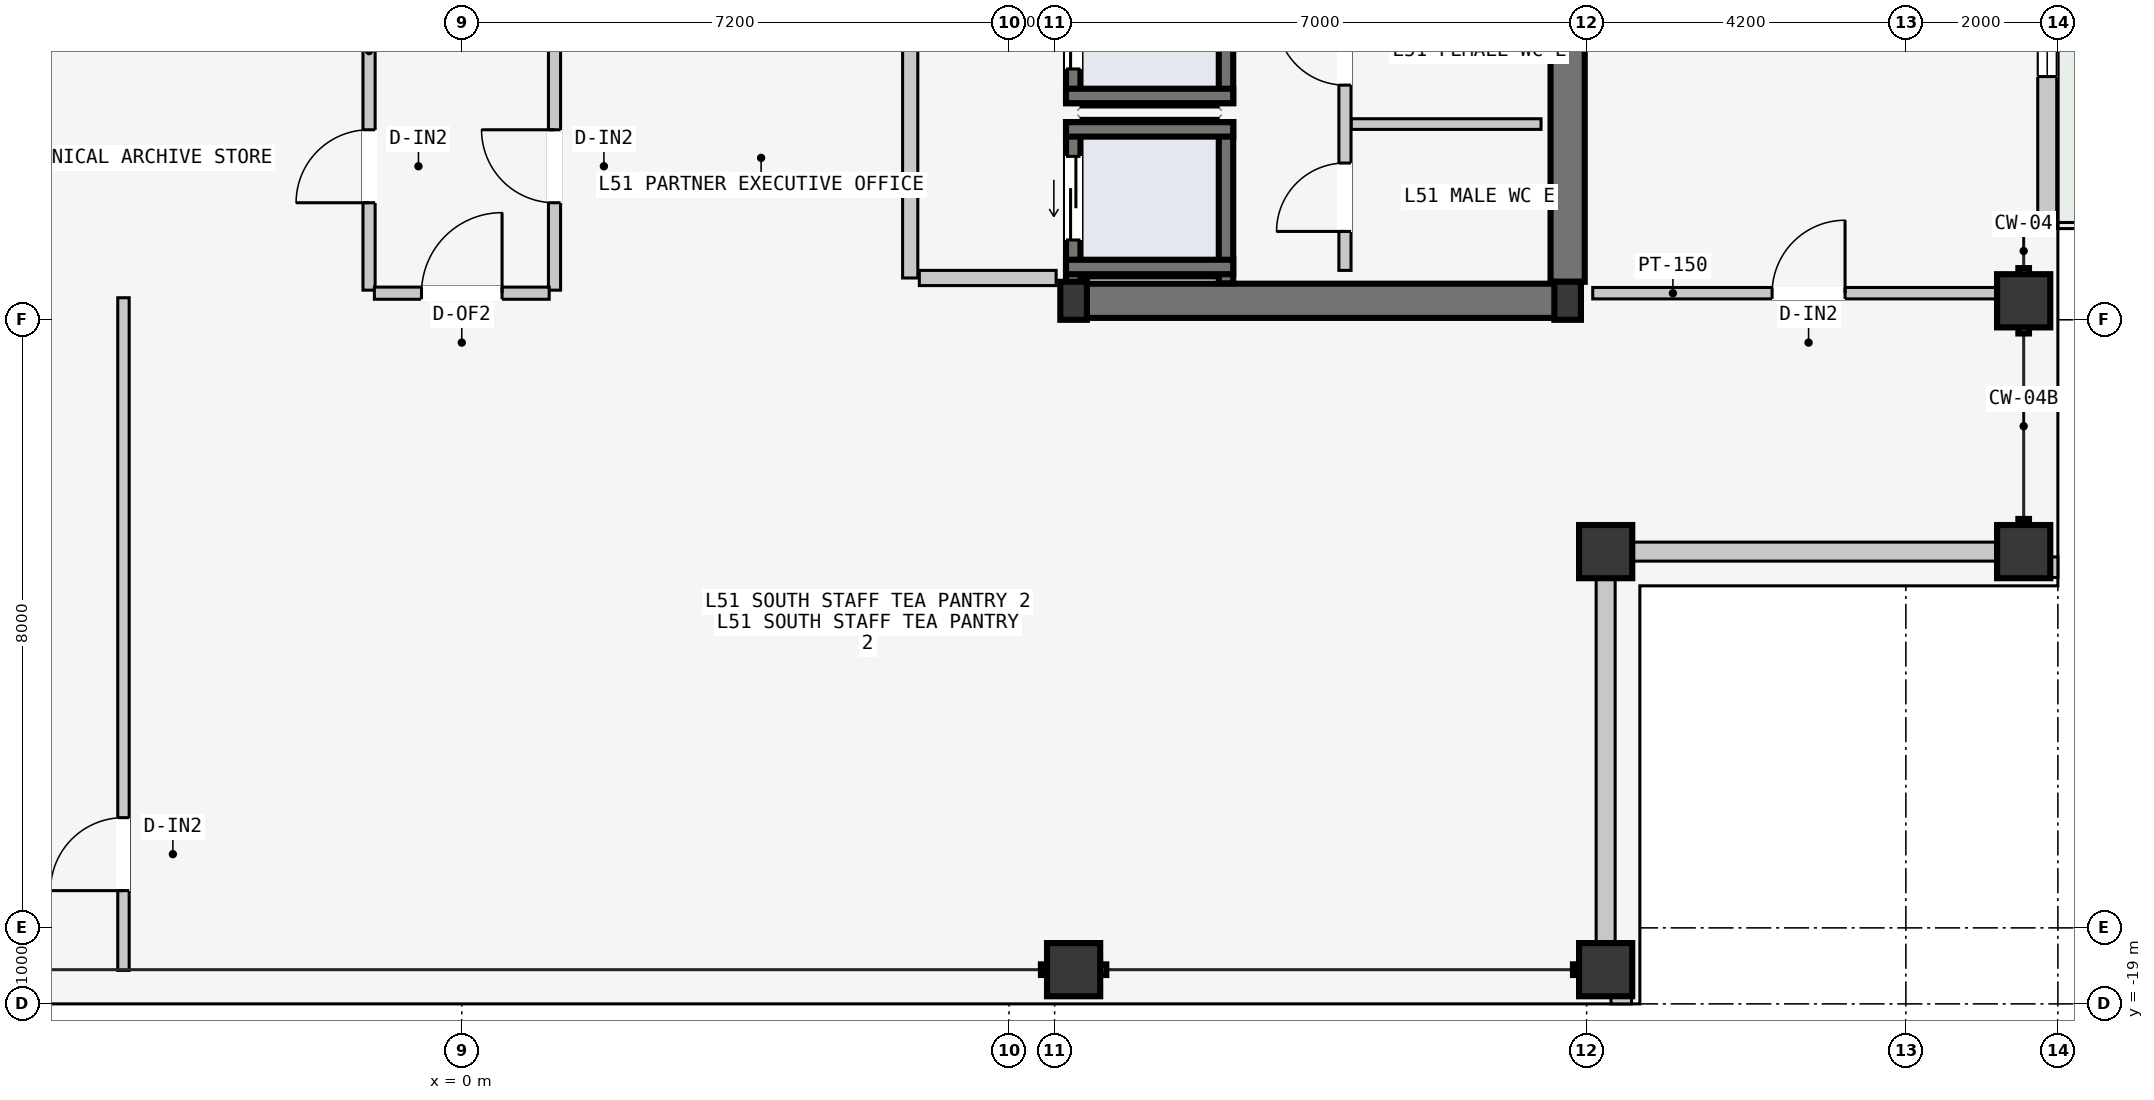
"""IFC4 building model, lengths in metres.
Left out: names, types, materials, properties, quantities, classifications, styles, units other than length and angle.
Written with IfcOpenShell. Run it as: python <this file> out.ifc"""

import sys

from ifc_helpers import new_model, si_unit, direction, frame, frame_2d, origin, origin_2d, place, context, subcontext, project, spatial, rectangle, hollow_rectangle, i_section, extrude, element, fill, save


model = new_model("IFC4")
c1 = context("Model", 3, precision=1e-05, world=origin(), true_north=direction((0.0, 1.0)))
c2 = subcontext(c1, "Body", "Model", "MODEL_VIEW")
j1 = project(units=[si_unit("LENGTHUNIT", "METRE"), si_unit("PLANEANGLEUNIT", "RADIAN")], contexts=[c1])
p1 = place(None, origin())
s1 = spatial("IfcSite", under=j1, at=p1, CompositionType="ELEMENT")
p2 = place(p1, origin())
s2 = spatial("IfcBuilding", under=s1, at=p2, CompositionType="ELEMENT")
p3 = place(p2, frame((0.0, 0.0, 194.7)))
s3 = spatial("IfcBuildingStorey", under=s2, at=p3, CompositionType="ELEMENT", Elevation=194.7)
p4 = place(p3, frame((8.07, -9.75, -0.2), z_axis=(0.0, 0.0, 1.0), x_axis=(1.0, 0.0, 0.0)))
e1 = element("IfcWall", 1, at=p4, inside=s3, PredefinedType="SHEAR", context=c2, shape_type="SweptSolid", body=[
    extrude(rectangle(XDim=6.46, YDim=0.45, at=frame_2d((3.23, 0.0))), origin(), (0.0, 0.0, 1.0), 3.6),
])
p5 = place(p3, frame((14.55, -9.5, -0.2), z_axis=(0.0, 0.0, 1.0), x_axis=(0.0, 1.0, 0.0)))
e2 = element("IfcWall", 2, at=p5, inside=s3, PredefinedType="SHEAR", context=c2, shape_type="SweptSolid", body=[
    extrude(rectangle(XDim=9.25, YDim=0.45, at=frame_2d((4.625, 0.0))), origin(), (0.0, 0.0, 1.0), 3.6),
])
for number, where, z_axis, x_axis in (
    (3, (8.05, -9.75, 0.0), (0.0, 0.0, 1.0), (1.0, 0.0, 0.0)),
    (4, (14.55, -9.75, 0.0), (0.0, 0.0, 1.0), (1.0, 0.0, 0.0)),
):
    element("IfcColumn", number, at=place(p3, frame(where, z_axis=z_axis, x_axis=x_axis)), inside=s3, PredefinedType="COLUMN", context=c2, shape_type="SweptSolid", body=[
        extrude(i_section(OverallWidth=0.35, OverallDepth=0.5, WebThickness=0.02, FlangeThickness=0.032, at=origin_2d()), origin(), (0.0, 0.0, 1.0), 3.6),
    ])
for number, where, z_axis, x_axis in (
    (5, (8.05, -18.55, 0.0), (0.0, 0.0, 1.0), (1.0, 0.0, 0.0)),
    (6, (15.05, -18.55, 0.0), (0.0, 0.0, 1.0), (1.0, 0.0, 0.0)),
    (7, (20.55, -13.05, 0.0), (0.0, 0.0, 1.0), (0.0, 1.0, 0.0)),
    (8, (20.55, -9.75, 0.0), (0.0, 0.0, 1.0), (0.0, 1.0, 0.0)),
    (9, (15.05, -13.05, 0.0), (0.0, 0.0, 1.0), (1.0, 0.0, 0.0)),
):
    element("IfcColumn", number, at=place(p3, frame(where, z_axis=z_axis, x_axis=x_axis)), inside=s3, PredefinedType="COLUMN", context=c2, shape_type="SweptSolid", body=[
        extrude(hollow_rectangle(XDim=0.7, YDim=0.7, WallThickness=0.03, at=origin_2d()), origin(), (0.0, 0.0, 1.0), 3.6),
    ])
p6 = place(p3, frame((20.86, -8.8, 0.0), z_axis=(0.0, 0.0, 1.0), x_axis=(0.0, 1.0, 0.0)))
e10 = element("IfcWall", 10, at=p6, inside=s3, PredefinedType="STANDARD", context=c2, shape_type="SweptSolid", body=[
    extrude(rectangle(XDim=10.8, YDim=0.25, at=frame_2d((5.4, 0.0))), origin(), (0.0, 0.0, 1.0), 3.4),
])
p7 = place(p6, frame((6.4, 0.0, 0.0)))
e11 = element("IfcOpeningElement", 11, at=p7, cuts=e10, PredefinedType="OPENING", context=c2, shape_type="SweptSolid", body=[
    extrude(rectangle(XDim=1.6, YDim=2.2, at=frame_2d((0.8, 1.1))), frame((0.0, 0.135, 0.0), z_axis=(0.0, -1.0, 0.0), x_axis=(1.0, 0.0, 0.0)), (0.0, 0.0, 1.0), 0.27),
])
p8 = place(p6, frame((2.0, 0.0, 0.85)))
e12 = element("IfcOpeningElement", 12, at=p8, cuts=e10, PredefinedType="OPENING", context=c2, shape_type="SweptSolid", body=[
    extrude(rectangle(XDim=2.0, YDim=2.1, at=frame_2d((1.0, 1.05))), frame((0.0, 0.135, 0.0), z_axis=(0.0, -1.0, 0.0), x_axis=(1.0, 0.0, 0.0)), (0.0, 0.0, 1.0), 0.27),
])
for number, where, z_axis, x_axis in (
    (13, (15.41, -13.05, 0.0), (0.0, 0.0, 1.0), (1.0, 0.0, 0.0)),
    (14, (15.05, -18.19, 0.0), (0.0, 0.0, 1.0), (0.0, 1.0, 0.0)),
):
    element("IfcWall", number, at=place(p3, frame(where, z_axis=z_axis, x_axis=x_axis)), inside=s3, PredefinedType="STANDARD", context=c2, shape_type="SweptSolid", body=[
        extrude(rectangle(XDim=4.78, YDim=0.25, at=frame_2d((2.39, 0.0))), origin(), (0.0, 0.0, 1.0), 2.75),
    ])
for number, where, z_axis, x_axis in (
    (15, (15.12, -18.89, 0.0), (0.0, 0.0, 1.0), (1.0, 0.0, 0.0)),
    (16, (20.89, -13.39, 0.0), (0.0, 0.0, 1.0), (0.0, 1.0, 0.0)),
):
    element("IfcWall", number, at=place(p3, frame(where, z_axis=z_axis, x_axis=x_axis)), inside=s3, PredefinedType="PARAPET", context=c2, shape_type="SweptSolid", body=[
        extrude(rectangle(XDim=0.27, YDim=0.22, at=frame_2d((0.135, 0.0))), origin(), (0.0, 0.0, 1.0), 1.2),
    ])
p9 = place(p3, frame((8.045, -9.52, -0.2), z_axis=(0.0, 0.0, 1.0), x_axis=(0.0, 1.0, 0.0)))
e17 = element("IfcWall", 17, at=p9, inside=s3, PredefinedType="SOLIDWALL", context=c2, shape_type="SweptSolid", body=[
    extrude(rectangle(XDim=2.12, YDim=0.19, at=frame_2d((1.06, 0.0))), origin(), (0.0, 0.0, 1.0), 3.6),
])
p10 = place(p9, frame((0.57, 0.0, 0.2)))
e18 = element("IfcOpeningElement", 18, at=p10, cuts=e17, PredefinedType="OPENING", context=c2, shape_type="SweptSolid", body=[
    extrude(rectangle(XDim=1.1, YDim=2.2, at=frame_2d((0.55, 1.1))), frame((0.0, 0.105, 0.0), z_axis=(0.0, -1.0, 0.0), x_axis=(1.0, 0.0, 0.0)), (0.0, 0.0, 1.0), 0.21),
])
p11 = place(p3, frame((10.055, -9.52, -0.2), z_axis=(0.0, 0.0, 1.0), x_axis=(0.0, 1.0, 0.0)))
e19 = element("IfcWall", 19, at=p11, inside=s3, PredefinedType="SOLIDWALL", context=c2, shape_type="SweptSolid", body=[
    extrude(rectangle(XDim=2.12, YDim=0.19, at=frame_2d((1.06, 0.0))), origin(), (0.0, 0.0, 1.0), 3.6),
])
for number, where, z_axis, x_axis in (
    (20, (7.95, -7.495, -0.2), (0.0, 0.0, 1.0), (1.0, 0.0, 0.0)),
    (21, (7.95, -9.305, -0.2), (0.0, 0.0, 1.0), (1.0, 0.0, 0.0)),
):
    element("IfcWall", number, at=place(p3, frame(where, z_axis=z_axis, x_axis=x_axis)), inside=s3, PredefinedType="SOLIDWALL", context=c2, shape_type="SweptSolid", body=[
        extrude(rectangle(XDim=2.2, YDim=0.19, at=frame_2d((1.1, 0.0))), origin(), (0.0, 0.0, 1.0), 3.6),
    ])
p12 = place(p3, frame((8.045, -7.15, -0.2), z_axis=(0.0, 0.0, 1.0), x_axis=(0.0, 1.0, 0.0)))
e22 = element("IfcWall", 22, at=p12, inside=s3, PredefinedType="SOLIDWALL", context=c2, shape_type="SweptSolid", body=[
    extrude(rectangle(XDim=2.0, YDim=0.19, at=frame_2d((1.0, 0.0))), origin(), (0.0, 0.0, 1.0), 3.6),
])
p13 = place(p12, frame((0.45, 0.0, 0.2)))
e23 = element("IfcOpeningElement", 23, at=p13, cuts=e22, PredefinedType="OPENING", context=c2, shape_type="SweptSolid", body=[
    extrude(rectangle(XDim=1.1, YDim=2.2, at=frame_2d((0.55, 1.1))), frame((0.0, 0.105, 0.0), z_axis=(0.0, -1.0, 0.0), x_axis=(1.0, 0.0, 0.0)), (0.0, 0.0, 1.0), 0.21),
])
p14 = place(p3, frame((10.055, -7.15, -0.2), z_axis=(0.0, 0.0, 1.0), x_axis=(0.0, 1.0, 0.0)))
e24 = element("IfcWall", 24, at=p14, inside=s3, PredefinedType="SOLIDWALL", context=c2, shape_type="SweptSolid", body=[
    extrude(rectangle(XDim=2.0, YDim=0.19, at=frame_2d((1.0, 0.0))), origin(), (0.0, 0.0, 1.0), 3.6),
])
p15 = place(p3, frame((7.95, -7.055, -0.2), z_axis=(0.0, 0.0, 1.0), x_axis=(1.0, 0.0, 0.0)))
e25 = element("IfcWall", 25, at=p15, inside=s3, PredefinedType="SOLIDWALL", context=c2, shape_type="SweptSolid", body=[
    extrude(rectangle(XDim=2.2, YDim=0.19, at=frame_2d((1.1, 0.0))), origin(), (0.0, 0.0, 1.0), 3.6),
])
p16 = place(p3, frame((5.9, -9.45, 0.0), z_axis=(0.0, 0.0, 1.0), x_axis=(0.0, 1.0, 0.0)))
e26 = element("IfcWall", 26, at=p16, inside=s3, PredefinedType="PARTITIONING", context=c2, shape_type="SweptSolid", body=[
    extrude(rectangle(XDim=10.5, YDim=0.2, at=frame_2d((5.25, 0.0))), origin(), (0.0, 0.0, 1.0), 3.4),
])
p17 = place(p16, frame((3.9, 0.0, 0.0)))
e27 = element("IfcOpeningElement", 27, at=p17, cuts=e26, PredefinedType="OPENING", context=c2, shape_type="SweptSolid", body=[
    extrude(rectangle(XDim=1.5, YDim=2.2, at=frame_2d((0.75, 1.1))), frame((0.0, 0.11, 0.0), z_axis=(0.0, -1.0, 0.0), x_axis=(1.0, 0.0, 0.0)), (0.0, 0.0, 1.0), 0.22),
])
p18 = place(p3, frame((6.02, -9.45, 0.0), z_axis=(0.0, 0.0, 1.0), x_axis=(1.0, 0.0, 0.0)))
e28 = element("IfcWall", 28, at=p18, inside=s3, PredefinedType="PARTITIONING", context=c2, shape_type="SweptSolid", body=[
    extrude(rectangle(XDim=1.8, YDim=0.2, at=frame_2d((0.9, 0.0))), origin(), (0.0, 0.0, 1.0), 3.4),
])
p19 = place(p3, frame((11.7, -7.425, 0.0), z_axis=(0.0, 0.0, 1.0), x_axis=(1.0, 0.0, 0.0)))
e29 = element("IfcWall", 29, at=p19, inside=s3, PredefinedType="PARTITIONING", context=c2, shape_type="SweptSolid", body=[
    extrude(rectangle(XDim=2.5, YDim=0.14, at=frame_2d((1.25, 0.0))), origin(), (0.0, 0.0, 1.0), 3.4),
])
p20 = place(p3, frame((11.62, -9.35, 0.0), z_axis=(0.0, 0.0, 1.0), x_axis=(0.0, 1.0, 0.0)))
e30 = element("IfcWall", 30, at=p20, inside=s3, PredefinedType="PARTITIONING", context=c2, shape_type="SweptSolid", body=[
    extrude(rectangle(XDim=3.85, YDim=0.16, at=frame_2d((1.925, 0.0))), origin(), (0.0, 0.0, 1.0), 3.4),
])
p21 = place(p20, frame((0.512, 0.0, 0.0)))
e31 = element("IfcOpeningElement", 31, at=p21, cuts=e30, PredefinedType="OPENING", context=c2, shape_type="SweptSolid", body=[
    extrude(rectangle(XDim=0.9, YDim=2.15, at=frame_2d((0.45, 1.075))), frame((0.0, 0.09, 0.0), z_axis=(0.0, -1.0, 0.0), x_axis=(1.0, 0.0, 0.0)), (0.0, 0.0, 1.0), 0.18),
])
p22 = place(p20, frame((2.438, 0.0, 0.0)))
e32 = element("IfcOpeningElement", 32, at=p22, cuts=e30, PredefinedType="OPENING", context=c2, shape_type="SweptSolid", body=[
    extrude(rectangle(XDim=0.9, YDim=2.15, at=frame_2d((0.45, 1.075))), frame((0.0, 0.09, 0.0), z_axis=(0.0, -1.0, 0.0), x_axis=(1.0, 0.0, 0.0)), (0.0, 0.0, 1.0), 0.18),
])
p23 = place(p3, frame((-1.22, -9.61, 0.0), z_axis=(0.0, 0.0, 1.0), x_axis=(0.0, 1.0, 0.0)))
e33 = element("IfcWall", 33, at=p23, inside=s3, PredefinedType="PARTITIONING", context=c2, shape_type="SweptSolid", body=[
    extrude(rectangle(XDim=3.93, YDim=0.16, at=frame_2d((1.965, 0.0))), origin(), (0.0, 0.0, 1.0), 3.4),
])
p24 = place(p23, frame((1.15, 0.0, 0.0)))
e34 = element("IfcOpeningElement", 34, at=p24, cuts=e33, PredefinedType="OPENING", context=c2, shape_type="SweptSolid", body=[
    extrude(rectangle(XDim=0.96, YDim=2.18, at=frame_2d((0.48, 1.09))), frame((0.0, 0.09, 0.0), z_axis=(0.0, -1.0, 0.0), x_axis=(1.0, 0.0, 0.0)), (0.0, 0.0, 1.0), 0.18),
])
p25 = place(p3, frame((1.22, -9.61, 0.0), z_axis=(0.0, 0.0, 1.0), x_axis=(0.0, 1.0, 0.0)))
e35 = element("IfcWall", 35, at=p25, inside=s3, PredefinedType="PARTITIONING", context=c2, shape_type="SweptSolid", body=[
    extrude(rectangle(XDim=3.93, YDim=0.16, at=frame_2d((1.965, 0.0))), origin(), (0.0, 0.0, 1.0), 3.4),
])
p26 = place(p25, frame((1.15, 0.0, 0.0)))
e36 = element("IfcOpeningElement", 36, at=p26, cuts=e35, PredefinedType="OPENING", context=c2, shape_type="SweptSolid", body=[
    extrude(rectangle(XDim=0.96, YDim=2.18, at=frame_2d((0.48, 1.09))), frame((0.0, 0.09, 0.0), z_axis=(0.0, -1.0, 0.0), x_axis=(1.0, 0.0, 0.0)), (0.0, 0.0, 1.0), 0.18),
])
p27 = place(p3, frame((-4.451, -18.56, 0.0), z_axis=(0.0, 0.0, 1.0), x_axis=(0.0, 1.0, 0.0)))
e37 = element("IfcWall", 37, at=p27, inside=s3, PredefinedType="PARTITIONING", context=c2, shape_type="SweptSolid", body=[
    extrude(rectangle(XDim=8.85, YDim=0.15, at=frame_2d((4.425, 0.0))), origin(), (0.0, 0.0, 1.0), 3.4),
])
p28 = place(p27, frame((1.05, 0.0, 0.0)))
e38 = element("IfcOpeningElement", 38, at=p28, cuts=e37, PredefinedType="OPENING", context=c2, shape_type="SweptSolid", body=[
    extrude(rectangle(XDim=0.96, YDim=2.18, at=frame_2d((0.48, 1.09))), frame((0.0, 0.085, 0.0), z_axis=(0.0, -1.0, 0.0), x_axis=(1.0, 0.0, 0.0)), (0.0, 0.0, 1.0), 0.17),
])
p29 = place(p3, frame((-1.15, -9.65, 0.0), z_axis=(0.0, 0.0, 1.0), x_axis=(1.0, 0.0, 0.0)))
e39 = element("IfcWall", 39, at=p29, inside=s3, PredefinedType="PARTITIONING", context=c2, shape_type="SweptSolid", body=[
    extrude(rectangle(XDim=2.3, YDim=0.16, at=frame_2d((1.15, 0.0))), origin(), (0.0, 0.0, 1.0), 2.75),
])
p30 = place(p29, frame((0.62, 0.0, 0.0)))
e40 = element("IfcOpeningElement", 40, at=p30, cuts=e39, PredefinedType="OPENING", context=c2, shape_type="SweptSolid", body=[
    extrude(rectangle(XDim=1.06, YDim=2.2, at=frame_2d((0.53, 1.1))), frame((0.0, 0.09, 0.0), z_axis=(0.0, -1.0, 0.0), x_axis=(1.0, 0.0, 0.0)), (0.0, 0.0, 1.0), 0.18),
])
p31 = place(p3, frame((14.88, -9.65, 0.0), z_axis=(0.0, 0.0, 1.0), x_axis=(1.0, 0.0, 0.0)))
e41 = element("IfcWall", 41, at=p31, inside=s3, PredefinedType="PARTITIONING", context=c2, shape_type="SweptSolid", body=[
    extrude(rectangle(XDim=5.68, YDim=0.15, at=frame_2d((2.84, 0.0))), origin(), (0.0, 0.0, 1.0), 2.75),
])
p32 = place(p31, frame((2.36, 0.0, 0.0)))
e42 = element("IfcOpeningElement", 42, at=p32, cuts=e41, PredefinedType="OPENING", context=c2, shape_type="SweptSolid", body=[
    extrude(rectangle(XDim=0.96, YDim=2.18, at=frame_2d((0.48, 1.09))), frame((0.0, 0.085, 0.0), z_axis=(0.0, -1.0, 0.0), x_axis=(1.0, 0.0, 0.0)), (0.0, 0.0, 1.0), 0.17),
])
p33 = place(p8, origin())
e43 = element("IfcWindow", 43, at=p33, inside=s3, PartitioningType="SINGLE_PANEL", PredefinedType="WINDOW", context=c2, shape_type="SweptSolid", body=[
    extrude(rectangle(XDim=2.0, YDim=2.1, at=frame_2d((1.0, 1.05))), frame((0.0, 0.03, 0.0), z_axis=(0.0, -1.0, 0.0), x_axis=(1.0, 0.0, 0.0)), (0.0, 0.0, 1.0), 0.06),
])
fill(e12, e43)
p34 = place(p10, origin())
e44 = element("IfcDoor", 44, at=p34, inside=s3, OperationType="SLIDING_TO_LEFT", PredefinedType="DOOR", context=c2, shape_type="SweptSolid", body=[
    extrude(rectangle(XDim=1.1, YDim=2.2, at=frame_2d((0.55, 1.1))), frame((0.0, 0.025, 0.0), z_axis=(0.0, -1.0, 0.0), x_axis=(1.0, 0.0, 0.0)), (0.0, 0.0, 1.0), 0.05),
])
fill(e18, e44)
p35 = place(p13, origin())
e45 = element("IfcDoor", 45, at=p35, inside=s3, OperationType="SLIDING_TO_LEFT", PredefinedType="DOOR", context=c2, shape_type="SweptSolid", body=[
    extrude(rectangle(XDim=1.1, YDim=2.2, at=frame_2d((0.55, 1.1))), frame((0.0, 0.025, 0.0), z_axis=(0.0, -1.0, 0.0), x_axis=(1.0, 0.0, 0.0)), (0.0, 0.0, 1.0), 0.05),
])
fill(e23, e45)
p36 = place(p21, origin())
e46 = element("IfcDoor", 46, at=p36, inside=s3, OperationType="SINGLE_SWING_LEFT", PredefinedType="DOOR", context=c2, shape_type="SweptSolid", body=[
    extrude(rectangle(XDim=0.9, YDim=2.15, at=frame_2d((0.45, 1.075))), frame((0.0, 0.025, 0.0), z_axis=(0.0, -1.0, 0.0), x_axis=(1.0, 0.0, 0.0)), (0.0, 0.0, 1.0), 0.05),
])
fill(e31, e46)
p37 = place(p22, origin())
e47 = element("IfcDoor", 47, at=p37, inside=s3, OperationType="SINGLE_SWING_RIGHT", PredefinedType="DOOR", context=c2, shape_type="SweptSolid", body=[
    extrude(rectangle(XDim=0.9, YDim=2.15, at=frame_2d((0.45, 1.075))), frame((0.0, 0.025, 0.0), z_axis=(0.0, -1.0, 0.0), x_axis=(1.0, 0.0, 0.0)), (0.0, 0.0, 1.0), 0.05),
])
fill(e32, e47)
p38 = place(p24, origin())
e48 = element("IfcDoor", 48, at=p38, inside=s3, OperationType="SINGLE_SWING_LEFT", PredefinedType="DOOR", context=c2, shape_type="SweptSolid", body=[
    extrude(rectangle(XDim=0.96, YDim=2.18, at=frame_2d((0.48, 1.09))), frame((0.0, 0.025, 0.0), z_axis=(0.0, -1.0, 0.0), x_axis=(1.0, 0.0, 0.0)), (0.0, 0.0, 1.0), 0.05),
])
fill(e34, e48)
p39 = place(p26, origin())
e49 = element("IfcDoor", 49, at=p39, inside=s3, OperationType="SINGLE_SWING_RIGHT", PredefinedType="DOOR", context=c2, shape_type="SweptSolid", body=[
    extrude(rectangle(XDim=0.96, YDim=2.18, at=frame_2d((0.48, 1.09))), frame((0.0, 0.025, 0.0), z_axis=(0.0, -1.0, 0.0), x_axis=(1.0, 0.0, 0.0)), (0.0, 0.0, 1.0), 0.05),
])
fill(e36, e49)
p40 = place(p28, origin())
e50 = element("IfcDoor", 50, at=p40, inside=s3, OperationType="SINGLE_SWING_LEFT", PredefinedType="DOOR", context=c2, shape_type="SweptSolid", body=[
    extrude(rectangle(XDim=0.96, YDim=2.18, at=frame_2d((0.48, 1.09))), frame((0.0, 0.025, 0.0), z_axis=(0.0, -1.0, 0.0), x_axis=(1.0, 0.0, 0.0)), (0.0, 0.0, 1.0), 0.05),
])
fill(e38, e50)
p41 = place(p30, origin())
e51 = element("IfcDoor", 51, at=p41, inside=s3, OperationType="SINGLE_SWING_RIGHT", PredefinedType="DOOR", context=c2, shape_type="SweptSolid", body=[
    extrude(rectangle(XDim=1.06, YDim=2.2, at=frame_2d((0.53, 1.1))), frame((0.0, 0.025, 0.0), z_axis=(0.0, -1.0, 0.0), x_axis=(1.0, 0.0, 0.0)), (0.0, 0.0, 1.0), 0.05),
])
fill(e40, e51)
p42 = place(p32, origin())
e52 = element("IfcDoor", 52, at=p42, inside=s3, OperationType="SINGLE_SWING_RIGHT", PredefinedType="DOOR", context=c2, shape_type="SweptSolid", body=[
    extrude(rectangle(XDim=0.96, YDim=2.18, at=frame_2d((0.48, 1.09))), frame((0.0, 0.025, 0.0), z_axis=(0.0, -1.0, 0.0), x_axis=(1.0, 0.0, 0.0)), (0.0, 0.0, 1.0), 0.05),
])
fill(e42, e52)
save(model, sys.argv[1])
